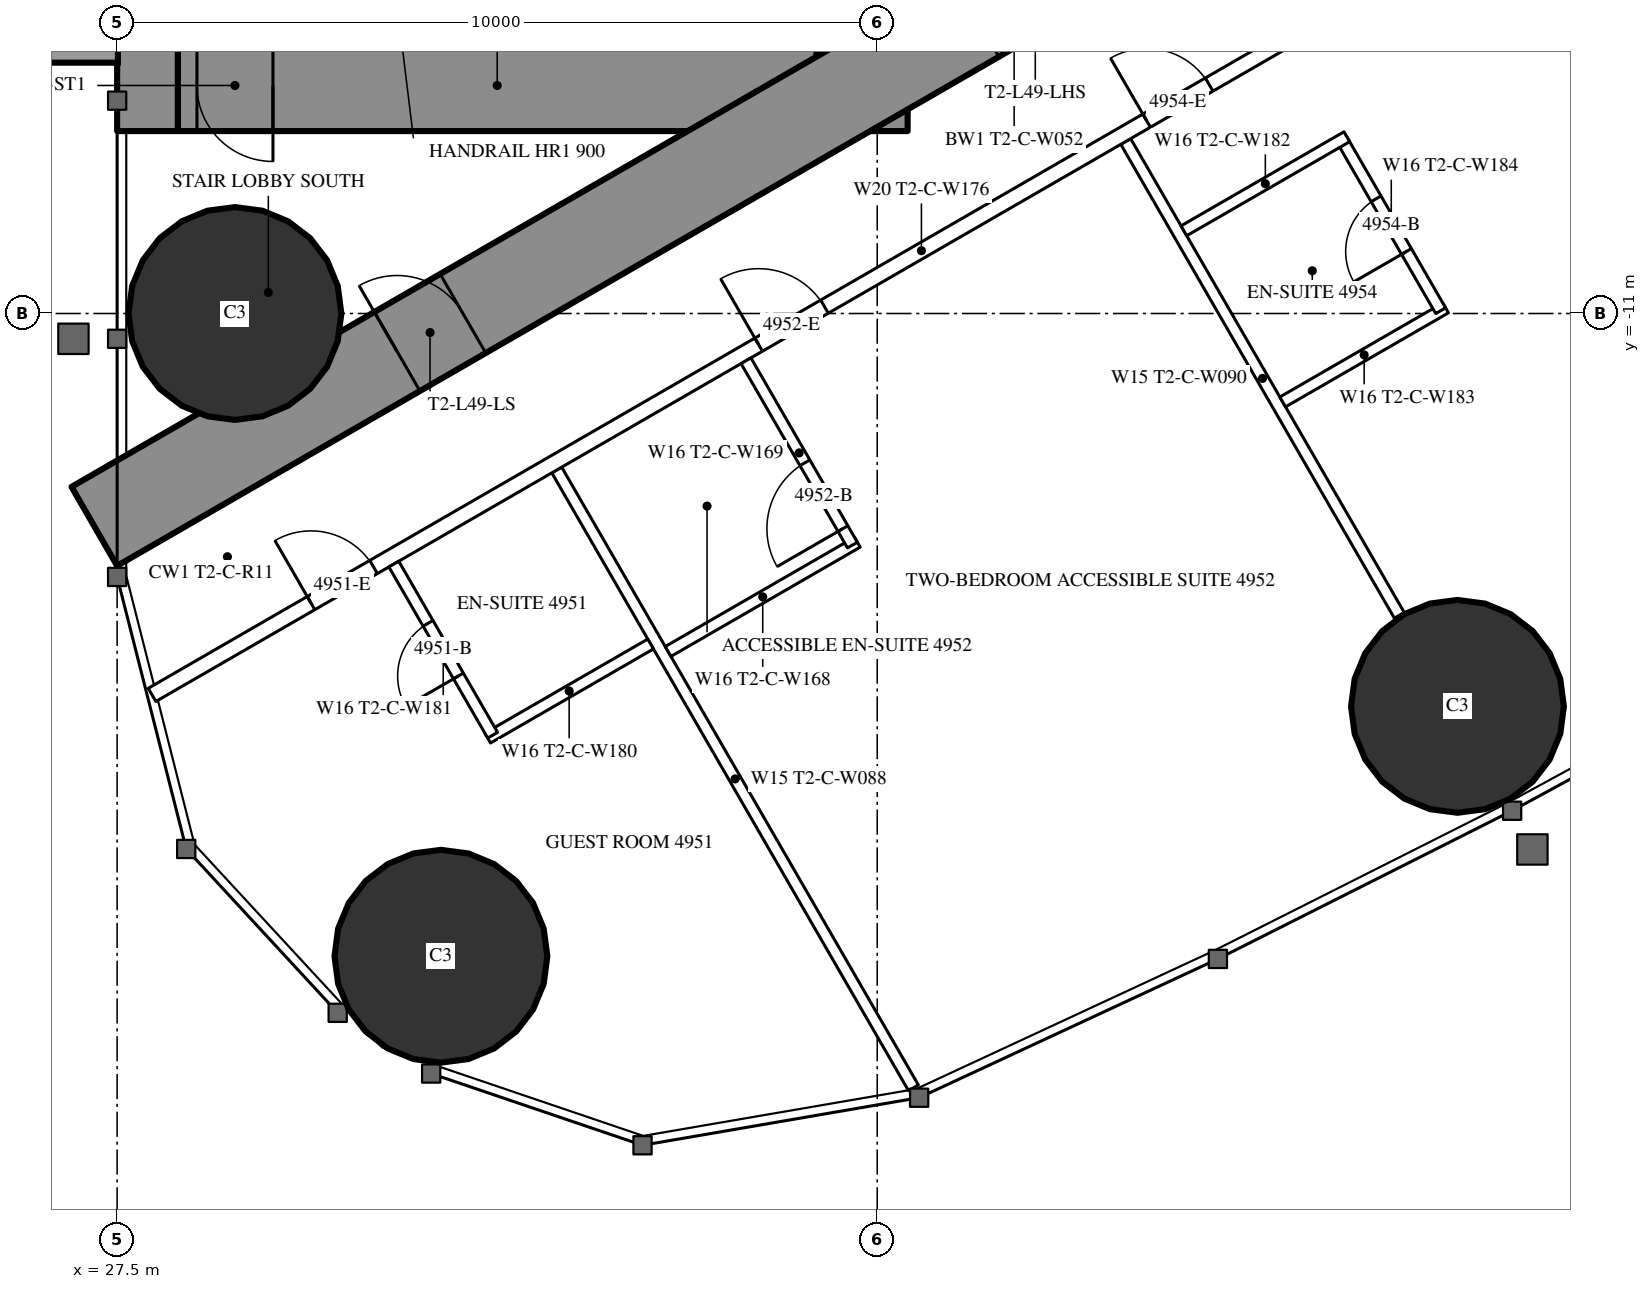
"""IFC4 building model, lengths in metres.
Left out: names, types, materials, properties, quantities, classifications, styles, units other than length and angle.
Written with IfcOpenShell. Run it as: python <this file> out.ifc"""

import sys

from ifc_helpers import new_model, si_unit, direction, frame, frame_2d, origin, origin_2d, place, context, subcontext, project, spatial, rectangle, circle, extrude, element, fill, save


model = new_model("IFC4")
c1 = context("Model", 3, precision=1e-05, world=origin(), true_north=direction((0.0, 1.0)))
c2 = subcontext(c1, "Body", "Model", "MODEL_VIEW")
j1 = project(units=[si_unit("LENGTHUNIT", "METRE"), si_unit("PLANEANGLEUNIT", "RADIAN")], contexts=[c1])
p1 = place(None, origin())
s1 = spatial("IfcSite", under=j1, at=p1, CompositionType="ELEMENT")
p2 = place(p1, origin())
s2 = spatial("IfcBuilding", under=s1, at=p2, CompositionType="ELEMENT")
p3 = place(p2, frame((0.0, 0.0, 184.3)))
s3 = spatial("IfcBuildingStorey", under=s2, at=p3, CompositionType="ELEMENT", Elevation=184.3)
for number, where, z_axis, x_axis in (
    (1, (31.76, -19.456, 0.0), (0.0, 0.0, 1.0), (1.0, 0.0, 0.0)),
    (2, (29.05, -11.0, 0.0), (0.0, 0.0, 1.0), (1.0, 0.0, 0.0)),
    (3, (45.134, -16.168, 0.0), (0.0, 0.0, 1.0), (1.0, 0.0, 0.0)),
):
    element("IfcColumn", number, at=place(p3, frame(where, z_axis=z_axis, x_axis=x_axis)), inside=s3, PredefinedType="COLUMN", context=c2, shape_type="SweptSolid", body=[
        extrude(circle(Radius=1.4, at=origin_2d()), origin(), (0.0, 0.0, 1.0), 3.5),
    ])
p4 = place(p3, frame((27.9, -8.6, 0.0), z_axis=(0.0, 0.0, 1.0), x_axis=(0.0, 1.0, 0.0)))
e4 = element("IfcWall", 4, at=p4, inside=s3, PredefinedType="SHEAR", context=c2, shape_type="SweptSolid", body=[
    extrude(rectangle(XDim=17.2, YDim=0.8, at=frame_2d((8.6, 0.0))), origin(), (0.0, 0.0, 1.0), 3.5),
])
p5 = place(p4, frame((2.45, 0.0, 0.6)))
e5 = element("IfcOpeningElement", 5, at=p5, cuts=e4, PredefinedType="OPENING", context=c2, shape_type="SweptSolid", body=[
    extrude(rectangle(XDim=0.6, YDim=2.1, at=frame_2d((0.3, 1.05))), frame((0.0, 0.41, 0.0), z_axis=(0.0, -1.0, 0.0), x_axis=(1.0, 0.0, 0.0)), (0.0, 0.0, 1.0), 0.82),
])
p6 = place(p4, frame((14.15, 0.0, 0.6)))
e6 = element("IfcOpeningElement", 6, at=p6, cuts=e4, PredefinedType="OPENING", context=c2, shape_type="SweptSolid", body=[
    extrude(rectangle(XDim=0.6, YDim=2.1, at=frame_2d((0.3, 1.05))), frame((0.0, 0.41, 0.0), z_axis=(0.0, -1.0, 0.0), x_axis=(1.0, 0.0, 0.0)), (0.0, 0.0, 1.0), 0.82),
])
p7 = place(p3, frame((37.3, -8.6, 0.0), z_axis=(0.0, 0.0, 1.0), x_axis=(0.0, 1.0, 0.0)))
e7 = element("IfcWall", 7, at=p7, inside=s3, PredefinedType="SHEAR", context=c2, shape_type="SweptSolid", body=[
    extrude(rectangle(XDim=17.2, YDim=1.2, at=frame_2d((8.6, 0.0))), origin(), (0.0, 0.0, 1.0), 3.5),
])
p8 = place(p7, frame((7.7, 0.0, 0.0)))
e8 = element("IfcOpeningElement", 8, at=p8, cuts=e7, PredefinedType="OPENING", context=c2, shape_type="SweptSolid", body=[
    extrude(rectangle(XDim=1.8, YDim=2.2, at=frame_2d((0.9, 1.1))), frame((0.0, 0.61, 0.0), z_axis=(0.0, -1.0, 0.0), x_axis=(1.0, 0.0, 0.0)), (0.0, 0.0, 1.0), 1.22),
])
p9 = place(p3, frame((28.3, -8.0, 0.0), z_axis=(0.0, 0.0, 1.0), x_axis=(1.0, 0.0, 0.0)))
e9 = element("IfcWall", 9, at=p9, inside=s3, PredefinedType="SHEAR", context=c2, shape_type="SweptSolid", body=[
    extrude(rectangle(XDim=8.4, YDim=1.2, at=frame_2d((4.2, 0.0))), origin(), (0.0, 0.0, 1.0), 3.5),
])
p10 = place(p9, frame((0.25, 0.0, 0.0)))
e10 = element("IfcOpeningElement", 10, at=p10, cuts=e9, PredefinedType="OPENING", context=c2, shape_type="SweptSolid", body=[
    extrude(rectangle(XDim=1.0, YDim=2.2, at=frame_2d((0.5, 1.1))), frame((0.0, 0.61, 0.0), z_axis=(0.0, -1.0, 0.0), x_axis=(1.0, 0.0, 0.0)), (0.0, 0.0, 1.0), 1.22),
])
p11 = place(p3, frame((27.2, -13.8, 0.0), z_axis=(0.0, 0.0, 1.0), x_axis=(0.866027159892, 0.499996958321, 0.0)))
e11 = element("IfcWall", 11, at=p11, inside=s3, PredefinedType="SHEAR", context=c2, shape_type="SweptSolid", body=[
    extrude(rectangle(XDim=27.947, YDim=1.2, at=frame_2d((13.973, 0.0))), origin(), (0.0, 0.0, 1.0), 3.5),
])
p12 = place(p11, frame((4.6, 0.0, 0.0)))
e12 = element("IfcOpeningElement", 12, at=p12, cuts=e11, PredefinedType="OPENING", context=c2, shape_type="SweptSolid", body=[
    extrude(rectangle(XDim=1.0, YDim=2.2, at=frame_2d((0.5, 1.1))), frame((0.0, 0.61, 0.0), z_axis=(0.0, -1.0, 0.0), x_axis=(1.0, 0.0, 0.0)), (0.0, 0.0, 1.0), 1.22),
])
p13 = place(p11, frame((13.395, 0.0, 0.0)))
e13 = element("IfcOpeningElement", 13, at=p13, cuts=e11, PredefinedType="OPENING", context=c2, shape_type="SweptSolid", body=[
    extrude(rectangle(XDim=1.8, YDim=2.2, at=frame_2d((0.9, 1.1))), frame((0.0, 0.61, 0.0), z_axis=(0.0, -1.0, 0.0), x_axis=(1.0, 0.0, 0.0)), (0.0, 0.0, 1.0), 1.22),
])
p14 = place(p3, frame((33.284, -13.059, 0.0), z_axis=(0.0, 0.0, 1.0), x_axis=(0.499985904184, -0.866033541855, 0.0)))
e14 = element("IfcWall", 14, at=p14, inside=s3, PredefinedType="PARTITIONING", context=c2, shape_type="SweptSolid", body=[
    extrude(rectangle(XDim=9.385, YDim=0.15, at=frame_2d((4.693, 0.0))), origin(), (0.0, 0.0, 1.0), 3.25),
])
p15 = place(p3, frame((40.769, -8.737, 0.0), z_axis=(0.0, 0.0, 1.0), x_axis=(0.500013115284, -0.866017831539, 0.0)))
e15 = element("IfcWall", 15, at=p15, inside=s3, PredefinedType="PARTITIONING", context=c2, shape_type="SweptSolid", body=[
    extrude(rectangle(XDim=7.198, YDim=0.15, at=frame_2d((3.599, 0.0))), origin(), (0.0, 0.0, 1.0), 2.3),
])
p16 = place(p3, frame((27.959, -16.017, 0.0), z_axis=(0.0, 0.0, 1.0), x_axis=(0.866024180982, 0.50000211795, 0.0)))
e16 = element("IfcWall", 16, at=p16, inside=s3, PredefinedType="PARTITIONING", context=c2, shape_type="SweptSolid", body=[
    extrude(rectangle(XDim=23.375, YDim=0.2, at=frame_2d((11.688, 0.0))), origin(), (0.0, 0.0, 1.0), 3.25),
])
p17 = place(p16, frame((2.415, 0.0, 0.0)))
e17 = element("IfcOpeningElement", 17, at=p17, cuts=e16, PredefinedType="OPENING", context=c2, shape_type="SweptSolid", body=[
    extrude(rectangle(XDim=0.95, YDim=2.2, at=frame_2d((0.475, 1.1))), frame((0.0, 0.11, 0.0), z_axis=(0.0, -1.0, 0.0), x_axis=(1.0, 0.0, 0.0)), (0.0, 0.0, 1.0), 0.22),
])
p18 = place(p16, frame((9.215, 0.0, 0.0)))
e18 = element("IfcOpeningElement", 18, at=p18, cuts=e16, PredefinedType="OPENING", context=c2, shape_type="SweptSolid", body=[
    extrude(rectangle(XDim=1.0, YDim=2.2, at=frame_2d((0.5, 1.1))), frame((0.0, 0.11, 0.0), z_axis=(0.0, -1.0, 0.0), x_axis=(1.0, 0.0, 0.0)), (0.0, 0.0, 1.0), 0.22),
])
p19 = place(p16, frame((15.109, 0.0, 0.0)))
e19 = element("IfcOpeningElement", 19, at=p19, cuts=e16, PredefinedType="OPENING", context=c2, shape_type="SweptSolid", body=[
    extrude(rectangle(XDim=0.95, YDim=2.2, at=frame_2d((0.475, 1.1))), frame((0.0, 0.11, 0.0), z_axis=(0.0, -1.0, 0.0), x_axis=(1.0, 0.0, 0.0)), (0.0, 0.0, 1.0), 0.22),
])
p20 = place(p3, frame((32.375, -16.585, 0.0), z_axis=(0.0, 0.0, 1.0), x_axis=(0.86604923931, 0.499958713387, 0.0)))
e20 = element("IfcWall", 20, at=p20, inside=s3, PredefinedType="PARTITIONING", context=c2, shape_type="SweptSolid", body=[
    extrude(rectangle(XDim=2.475, YDim=0.15, at=frame_2d((1.237, 0.0))), origin(), (0.0, 0.0, 1.0), 3.25),
])
p21 = place(p3, frame((31.14, -14.296, 0.0), z_axis=(0.0, 0.0, 1.0), x_axis=(0.500006934395, -0.866021400173, 0.0)))
e21 = element("IfcWall", 21, at=p21, inside=s3, PredefinedType="PARTITIONING", context=c2, shape_type="SweptSolid", body=[
    extrude(rectangle(XDim=2.6, YDim=0.15, at=frame_2d((1.3, 0.0))), origin(), (0.0, 0.0, 1.0), 3.25),
])
p22 = place(p21, frame((0.9, 0.0, 0.0)))
e22 = element("IfcOpeningElement", 22, at=p22, cuts=e21, PredefinedType="OPENING", context=c2, shape_type="SweptSolid", body=[
    extrude(rectangle(XDim=0.8, YDim=2.2, at=frame_2d((0.4, 1.1))), frame((0.0, 0.085, 0.0), z_axis=(0.0, -1.0, 0.0), x_axis=(1.0, 0.0, 0.0)), (0.0, 0.0, 1.0), 0.17),
])
p23 = place(p3, frame((34.749, -15.446, 0.0), z_axis=(0.0, 0.0, 1.0), x_axis=(0.866018712932, 0.500011588718, 0.0)))
e23 = element("IfcWall", 23, at=p23, inside=s3, PredefinedType="PARTITIONING", context=c2, shape_type="SweptSolid", body=[
    extrude(rectangle(XDim=2.875, YDim=0.15, at=frame_2d((1.438, 0.0))), origin(), (0.0, 0.0, 1.0), 3.25),
])
p24 = place(p3, frame((35.773, -11.621, 0.0), z_axis=(0.0, 0.0, 1.0), x_axis=(0.49998411664, -0.866034573852, 0.0)))
e24 = element("IfcWall", 24, at=p24, inside=s3, PredefinedType="PARTITIONING", context=c2, shape_type="SweptSolid", body=[
    extrude(rectangle(XDim=2.8, YDim=0.15, at=frame_2d((1.4, 0.0))), origin(), (0.0, 0.0, 1.0), 3.25),
])
p25 = place(p24, frame((1.55, 0.0, 0.0)))
e25 = element("IfcOpeningElement", 25, at=p25, cuts=e24, PredefinedType="OPENING", context=c2, shape_type="SweptSolid", body=[
    extrude(rectangle(XDim=1.0, YDim=2.2, at=frame_2d((0.5, 1.1))), frame((0.0, 0.085, 0.0), z_axis=(0.0, -1.0, 0.0), x_axis=(1.0, 0.0, 0.0)), (0.0, 0.0, 1.0), 0.17),
])
p26 = place(p3, frame((42.834, -12.164, 0.0), z_axis=(0.0, 0.0, 1.0), x_axis=(0.866031185235, 0.4999899861, 0.0)))
e26 = element("IfcWall", 26, at=p26, inside=s3, PredefinedType="PARTITIONING", context=c2, shape_type="SweptSolid", body=[
    extrude(rectangle(XDim=2.475, YDim=0.15, at=frame_2d((1.238, 0.0))), origin(), (0.0, 0.0, 1.0), 3.25),
])
p27 = place(p3, frame((43.613, -8.712, 0.0), z_axis=(0.0, 0.0, 1.0), x_axis=(0.500006934395, -0.866021400173, 0.0)))
e27 = element("IfcWall", 27, at=p27, inside=s3, PredefinedType="PARTITIONING", context=c2, shape_type="SweptSolid", body=[
    extrude(rectangle(XDim=2.6, YDim=0.15, at=frame_2d((1.3, 0.0))), origin(), (0.0, 0.0, 1.0), 3.25),
])
p28 = place(p27, frame((0.9, 0.0, 0.0)))
e28 = element("IfcOpeningElement", 28, at=p28, cuts=e27, PredefinedType="OPENING", context=c2, shape_type="SweptSolid", body=[
    extrude(rectangle(XDim=0.8, YDim=2.2, at=frame_2d((0.4, 1.1))), frame((0.0, 0.085, 0.0), z_axis=(0.0, -1.0, 0.0), x_axis=(1.0, 0.0, 0.0)), (0.0, 0.0, 1.0), 0.17),
])
p29 = place(p3, frame((41.534, -9.912, 0.0), z_axis=(0.0, 0.0, 1.0), x_axis=(0.866031185235, 0.4999899861, 0.0)))
e29 = element("IfcWall", 29, at=p29, inside=s3, PredefinedType="PARTITIONING", context=c2, shape_type="SweptSolid", body=[
    extrude(rectangle(XDim=2.475, YDim=0.15, at=frame_2d((1.238, 0.0))), origin(), (0.0, 0.0, 1.0), 3.25),
])
p30 = place(p22, origin())
e30 = element("IfcDoor", 30, at=p30, inside=s3, OperationType="SINGLE_SWING_RIGHT", PredefinedType="DOOR", context=c2, shape_type="SweptSolid", body=[
    extrude(rectangle(XDim=0.8, YDim=2.2, at=frame_2d((0.4, 1.1))), frame((0.0, 0.025, 0.0), z_axis=(0.0, -1.0, 0.0), x_axis=(1.0, 0.0, 0.0)), (0.0, 0.0, 1.0), 0.05),
])
fill(e22, e30)
p31 = place(p17, origin())
e31 = element("IfcDoor", 31, at=p31, inside=s3, OperationType="SINGLE_SWING_LEFT", PredefinedType="DOOR", context=c2, shape_type="SweptSolid", body=[
    extrude(rectangle(XDim=0.95, YDim=2.2, at=frame_2d((0.475, 1.1))), frame((0.0, 0.025, 0.0), z_axis=(0.0, -1.0, 0.0), x_axis=(1.0, 0.0, 0.0)), (0.0, 0.0, 1.0), 0.05),
])
fill(e17, e31)
p32 = place(p25, origin())
e32 = element("IfcDoor", 32, at=p32, inside=s3, OperationType="SINGLE_SWING_RIGHT", PredefinedType="DOOR", context=c2, shape_type="SweptSolid", body=[
    extrude(rectangle(XDim=1.0, YDim=2.2, at=frame_2d((0.5, 1.1))), frame((0.0, 0.025, 0.0), z_axis=(0.0, -1.0, 0.0), x_axis=(1.0, 0.0, 0.0)), (0.0, 0.0, 1.0), 0.05),
])
fill(e25, e32)
p33 = place(p18, origin())
e33 = element("IfcDoor", 33, at=p33, inside=s3, OperationType="SINGLE_SWING_LEFT", PredefinedType="DOOR", context=c2, shape_type="SweptSolid", body=[
    extrude(rectangle(XDim=1.0, YDim=2.2, at=frame_2d((0.5, 1.1))), frame((0.0, 0.025, 0.0), z_axis=(0.0, -1.0, 0.0), x_axis=(1.0, 0.0, 0.0)), (0.0, 0.0, 1.0), 0.05),
])
fill(e18, e33)
p34 = place(p28, origin())
e34 = element("IfcDoor", 34, at=p34, inside=s3, OperationType="SINGLE_SWING_RIGHT", PredefinedType="DOOR", context=c2, shape_type="SweptSolid", body=[
    extrude(rectangle(XDim=0.8, YDim=2.2, at=frame_2d((0.4, 1.1))), frame((0.0, 0.025, 0.0), z_axis=(0.0, -1.0, 0.0), x_axis=(1.0, 0.0, 0.0)), (0.0, 0.0, 1.0), 0.05),
])
fill(e28, e34)
p35 = place(p19, origin())
e35 = element("IfcDoor", 35, at=p35, inside=s3, OperationType="SINGLE_SWING_LEFT", PredefinedType="DOOR", context=c2, shape_type="SweptSolid", body=[
    extrude(rectangle(XDim=0.95, YDim=2.2, at=frame_2d((0.475, 1.1))), frame((0.0, 0.025, 0.0), z_axis=(0.0, -1.0, 0.0), x_axis=(1.0, 0.0, 0.0)), (0.0, 0.0, 1.0), 0.05),
])
fill(e19, e35)
p36 = place(p12, origin())
e36 = element("IfcDoor", 36, at=p36, inside=s3, OperationType="SINGLE_SWING_LEFT", PredefinedType="DOOR", context=c2, shape_type="SweptSolid", body=[
    extrude(rectangle(XDim=1.0, YDim=2.2, at=frame_2d((0.5, 1.1))), frame((0.0, 0.025, 0.0), z_axis=(0.0, -1.0, 0.0), x_axis=(1.0, 0.0, 0.0)), (0.0, 0.0, 1.0), 0.05),
])
fill(e12, e36)
p37 = place(p10, origin())
e37 = element("IfcDoor", 37, at=p37, inside=s3, OperationType="SINGLE_SWING_RIGHT", PredefinedType="DOOR", context=c2, shape_type="SweptSolid", body=[
    extrude(rectangle(XDim=1.0, YDim=2.2, at=frame_2d((0.5, 1.1))), frame((0.0, 0.025, 0.0), z_axis=(0.0, -1.0, 0.0), x_axis=(1.0, 0.0, 0.0)), (0.0, 0.0, 1.0), 0.05),
])
fill(e10, e37)
save(model, sys.argv[1])
